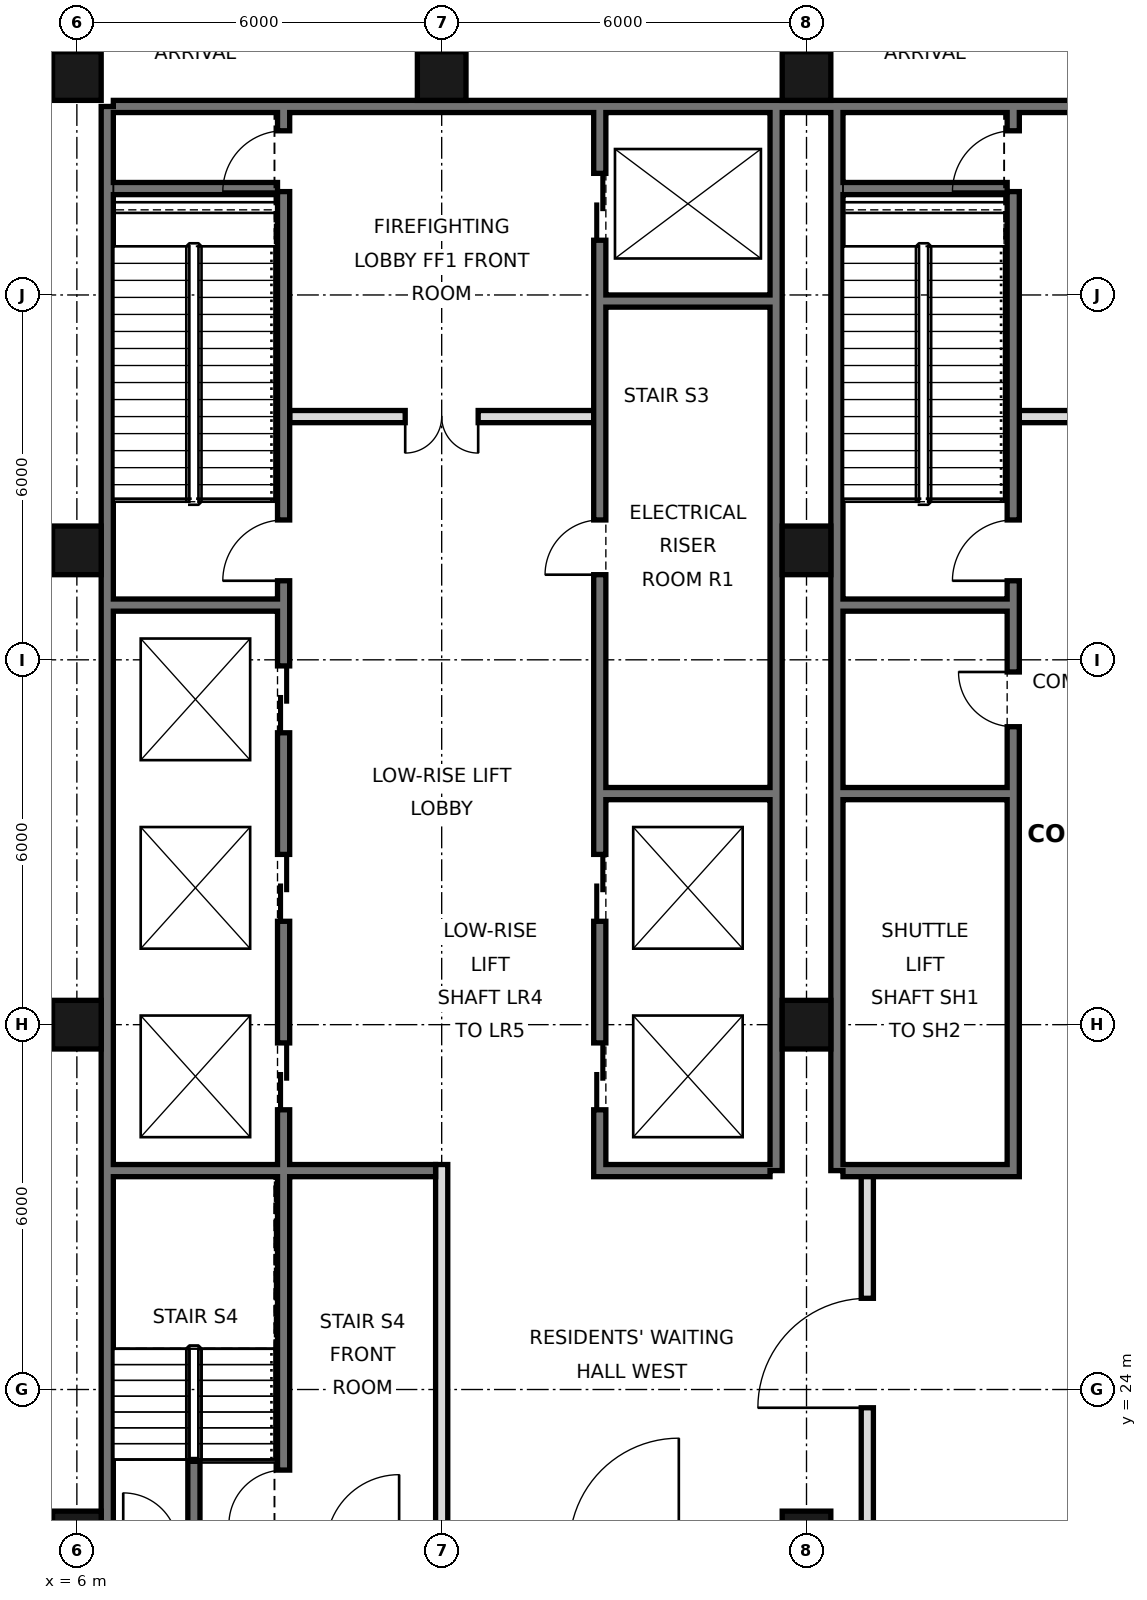
"""IFC4 building model, lengths in metres.
Left out: names, types, materials, properties, quantities, classifications, styles, units other than length and angle.
Written with IfcOpenShell. Run it as: python <this file> out.ifc"""

import sys

from ifc_helpers import new_model, si_unit, direction, frame, frame_2d, origin, origin_2d, place, context, subcontext, project, spatial, rectangle, hollow_rectangle, extrude, element, fill, save


model = new_model("IFC4")
c1 = context("Model", 3, precision=1e-05, world=origin(), true_north=direction((0.0, 1.0)))
c2 = subcontext(c1, "Body", "Model", "MODEL_VIEW")
j1 = project(units=[si_unit("LENGTHUNIT", "METRE"), si_unit("PLANEANGLEUNIT", "RADIAN")], contexts=[c1])
p1 = place(None, origin())
s1 = spatial("IfcSite", under=j1, at=p1, CompositionType="ELEMENT")
p2 = place(p1, origin())
s2 = spatial("IfcBuilding", under=s1, at=p2, CompositionType="ELEMENT")
p3 = place(p2, frame((0.0, 0.0, 138.4)))
s3 = spatial("IfcBuildingStorey", under=s2, at=p3, CompositionType="ELEMENT", Elevation=138.4)
for number, where, z_axis, x_axis in (
    (1, (6.0, 21.6, 0.0), (0.0, 0.0, 1.0), (1.0, 0.0, 0.0)),
    (2, (6.0, 30.0, 0.0), (0.0, 0.0, 1.0), (1.0, 0.0, 0.0)),
    (3, (6.0, 37.8, 0.0), (0.0, 0.0, 1.0), (1.0, 0.0, 0.0)),
    (4, (6.0, 45.6, 0.0), (0.0, 0.0, 1.0), (1.0, 0.0, 0.0)),
    (5, (12.0, 45.6, 0.0), (0.0, 0.0, 1.0), (1.0, 0.0, 0.0)),
    (6, (18.0, 21.6, 0.0), (0.0, 0.0, 1.0), (1.0, 0.0, 0.0)),
    (7, (18.0, 30.0, 0.0), (0.0, 0.0, 1.0), (1.0, 0.0, 0.0)),
    (8, (18.0, 37.8, 0.0), (0.0, 0.0, 1.0), (1.0, 0.0, 0.0)),
    (9, (18.0, 45.6, 0.0), (0.0, 0.0, 1.0), (1.0, 0.0, 0.0)),
):
    element("IfcColumn", number, at=place(p3, frame(where, z_axis=z_axis, x_axis=x_axis)), inside=s3, PredefinedType="COLUMN", context=c2, shape_type="SweptSolid", body=[
        extrude(hollow_rectangle(XDim=0.8, YDim=0.8, WallThickness=0.05, at=origin_2d()), origin(), (0.0, 0.0, 1.0), 5.4),
    ])
p4 = place(p3, frame((6.5, 21.6, 0.0), z_axis=(0.0, 0.0, 1.0), x_axis=(0.0, 1.0, 0.0)))
e10 = element("IfcWall", 10, at=p4, inside=s3, PredefinedType="SOLIDWALL", context=c2, shape_type="SweptSolid", body=[
    extrude(rectangle(XDim=23.5, YDim=0.2, at=frame_2d((11.75, 0.0))), origin(), (0.0, 0.0, 1.0), 5.22),
])
p5 = place(p3, frame((6.6, 45.1, 0.0), z_axis=(0.0, 0.0, 1.0), x_axis=(1.0, 0.0, 0.0)))
e11 = element("IfcWall", 11, at=p5, inside=s3, PredefinedType="SOLIDWALL", context=c2, shape_type="SweptSolid", body=[
    extrude(rectangle(XDim=34.8, YDim=0.2, at=frame_2d((17.4, 0.0))), origin(), (0.0, 0.0, 1.0), 5.22),
])
for number, where, z_axis, x_axis in (
    (12, (17.5, 27.6, 0.0), (0.0, 0.0, 1.0), (0.0, 1.0, 0.0)),
    (13, (18.5, 27.6, 0.0), (0.0, 0.0, 1.0), (0.0, 1.0, 0.0)),
):
    element("IfcWall", number, at=place(p3, frame(where, z_axis=z_axis, x_axis=x_axis)), inside=s3, PredefinedType="SOLIDWALL", context=c2, shape_type="SweptSolid", body=[
        extrude(rectangle(XDim=17.5, YDim=0.2, at=frame_2d((8.75, 0.0))), origin(), (0.0, 0.0, 1.0), 5.22),
    ])
p6 = place(p3, frame((19.0, 21.6, 0.0), z_axis=(0.0, 0.0, 1.0), x_axis=(0.0, 1.0, 0.0)))
e14 = element("IfcWall", 14, at=p6, inside=s3, PredefinedType="PARTITIONING", context=c2, shape_type="SweptSolid", body=[
    extrude(rectangle(XDim=6.0, YDim=0.2, at=frame_2d((3.0, 0.0))), origin(), (0.0, 0.0, 1.0), 5.22),
])
p7 = place(p6, frame((2.1, 0.0, 0.0)))
e15 = element("IfcOpeningElement", 15, at=p7, cuts=e14, PredefinedType="OPENING", context=c2, shape_type="SweptSolid", body=[
    extrude(rectangle(XDim=1.8, YDim=2.1, at=frame_2d((0.9, 1.05))), frame((0.0, 0.11, 0.0), z_axis=(0.0, -1.0, 0.0), x_axis=(1.0, 0.0, 0.0)), (0.0, 0.0, 1.0), 0.22),
])
p8 = place(p3, frame((12.0, 21.6, 0.0), z_axis=(0.0, 0.0, 1.0), x_axis=(0.0, 1.0, 0.0)))
e16 = element("IfcWall", 16, at=p8, inside=s3, PredefinedType="PARTITIONING", context=c2, shape_type="SweptSolid", body=[
    extrude(rectangle(XDim=6.1, YDim=0.2, at=frame_2d((3.05, 0.0))), origin(), (0.0, 0.0, 1.0), 5.22),
])
p9 = place(p3, frame((14.6, 27.5, 0.0), z_axis=(0.0, 0.0, 1.0), x_axis=(0.0, 1.0, 0.0)))
e17 = element("IfcWall", 17, at=p9, inside=s3, PredefinedType="SOLIDWALL", context=c2, shape_type="SweptSolid", body=[
    extrude(rectangle(XDim=17.5, YDim=0.2, at=frame_2d((8.75, 0.0))), origin(), (0.0, 0.0, 1.0), 5.22),
])
p10 = place(p9, frame((1.1, 0.0, 0.0)))
e18 = element("IfcOpeningElement", 18, at=p10, cuts=e17, PredefinedType="OPENING", context=c2, shape_type="SweptSolid", body=[
    extrude(rectangle(XDim=1.1, YDim=2.1, at=frame_2d((0.55, 1.05))), frame((0.0, 0.11, 0.0), z_axis=(0.0, -1.0, 0.0), x_axis=(1.0, 0.0, 0.0)), (0.0, 0.0, 1.0), 0.22),
])
p11 = place(p9, frame((4.2, 0.0, 0.0)))
e19 = element("IfcOpeningElement", 19, at=p11, cuts=e17, PredefinedType="OPENING", context=c2, shape_type="SweptSolid", body=[
    extrude(rectangle(XDim=1.1, YDim=2.1, at=frame_2d((0.55, 1.05))), frame((0.0, 0.11, 0.0), z_axis=(0.0, -1.0, 0.0), x_axis=(1.0, 0.0, 0.0)), (0.0, 0.0, 1.0), 0.22),
])
p12 = place(p9, frame((15.4, 0.0, 0.0)))
e20 = element("IfcOpeningElement", 20, at=p12, cuts=e17, PredefinedType="OPENING", context=c2, shape_type="SweptSolid", body=[
    extrude(rectangle(XDim=1.1, YDim=2.1, at=frame_2d((0.55, 1.05))), frame((0.0, 0.11, 0.0), z_axis=(0.0, -1.0, 0.0), x_axis=(1.0, 0.0, 0.0)), (0.0, 0.0, 1.0), 0.22),
])
p13 = place(p9, frame((9.9, 0.0, 0.0)))
e21 = element("IfcOpeningElement", 21, at=p13, cuts=e17, PredefinedType="OPENING", context=c2, shape_type="SweptSolid", body=[
    extrude(rectangle(XDim=0.9, YDim=2.1, at=frame_2d((0.45, 1.05))), frame((0.0, 0.11, 0.0), z_axis=(0.0, -1.0, 0.0), x_axis=(1.0, 0.0, 0.0)), (0.0, 0.0, 1.0), 0.22),
])
p14 = place(p3, frame((21.4, 27.5, 0.0), z_axis=(0.0, 0.0, 1.0), x_axis=(0.0, 1.0, 0.0)))
e22 = element("IfcWall", 22, at=p14, inside=s3, PredefinedType="SOLIDWALL", context=c2, shape_type="SweptSolid", body=[
    extrude(rectangle(XDim=17.5, YDim=0.2, at=frame_2d((8.75, 0.0))), origin(), (0.0, 0.0, 1.0), 5.22),
])
p15 = place(p14, frame((16.2, 0.0, 0.0)))
e23 = element("IfcOpeningElement", 23, at=p15, cuts=e22, PredefinedType="OPENING", context=c2, shape_type="SweptSolid", body=[
    extrude(rectangle(XDim=1.0, YDim=2.1, at=frame_2d((0.5, 1.05))), frame((0.0, 0.11, 0.0), z_axis=(0.0, -1.0, 0.0), x_axis=(1.0, 0.0, 0.0)), (0.0, 0.0, 1.0), 0.22),
])
p16 = place(p14, frame((9.8, 0.0, 0.0)))
e24 = element("IfcOpeningElement", 24, at=p16, cuts=e22, PredefinedType="OPENING", context=c2, shape_type="SweptSolid", body=[
    extrude(rectangle(XDim=1.0, YDim=2.1, at=frame_2d((0.5, 1.05))), frame((0.0, 0.11, 0.0), z_axis=(0.0, -1.0, 0.0), x_axis=(1.0, 0.0, 0.0)), (0.0, 0.0, 1.0), 0.22),
])
p17 = place(p14, frame((7.4, 0.0, 0.0)))
e25 = element("IfcOpeningElement", 25, at=p17, cuts=e22, PredefinedType="OPENING", context=c2, shape_type="SweptSolid", body=[
    extrude(rectangle(XDim=0.9, YDim=2.1, at=frame_2d((0.45, 1.05))), frame((0.0, 0.11, 0.0), z_axis=(0.0, -1.0, 0.0), x_axis=(1.0, 0.0, 0.0)), (0.0, 0.0, 1.0), 0.22),
])
p18 = place(p3, frame((7.925, 21.6, 0.0), z_axis=(0.0, 0.0, 1.0), x_axis=(0.0, 1.0, 0.0)))
e26 = element("IfcWall", 26, at=p18, inside=s3, PredefinedType="SOLIDWALL", context=c2, shape_type="SweptSolid", body=[
    extrude(rectangle(XDim=1.25, YDim=0.2, at=frame_2d((0.625, 0.0))), origin(), (0.0, 0.0, 1.0), 5.22),
])
p19 = place(p3, frame((9.4, 21.6, 0.0), z_axis=(0.0, 0.0, 1.0), x_axis=(0.0, 1.0, 0.0)))
e27 = element("IfcWall", 27, at=p19, inside=s3, PredefinedType="SOLIDWALL", context=c2, shape_type="SweptSolid", body=[
    extrude(rectangle(XDim=23.4, YDim=0.2, at=frame_2d((11.7, 0.0))), origin(), (0.0, 0.0, 1.0), 5.22),
])
p20 = place(p19, frame((7.0, 0.0, 0.0)))
e28 = element("IfcOpeningElement", 28, at=p20, cuts=e27, PredefinedType="OPENING", context=c2, shape_type="SweptSolid", body=[
    extrude(rectangle(XDim=1.1, YDim=2.1, at=frame_2d((0.55, 1.05))), frame((0.0, 0.11, 0.0), z_axis=(0.0, -1.0, 0.0), x_axis=(1.0, 0.0, 0.0)), (0.0, 0.0, 1.0), 0.22),
])
p21 = place(p19, frame((10.1, 0.0, 0.0)))
e29 = element("IfcOpeningElement", 29, at=p21, cuts=e27, PredefinedType="OPENING", context=c2, shape_type="SweptSolid", body=[
    extrude(rectangle(XDim=1.1, YDim=2.1, at=frame_2d((0.55, 1.05))), frame((0.0, 0.11, 0.0), z_axis=(0.0, -1.0, 0.0), x_axis=(1.0, 0.0, 0.0)), (0.0, 0.0, 1.0), 0.22),
])
p22 = place(p19, frame((13.2, 0.0, 0.0)))
e30 = element("IfcOpeningElement", 30, at=p22, cuts=e27, PredefinedType="OPENING", context=c2, shape_type="SweptSolid", body=[
    extrude(rectangle(XDim=1.1, YDim=2.1, at=frame_2d((0.55, 1.05))), frame((0.0, 0.11, 0.0), z_axis=(0.0, -1.0, 0.0), x_axis=(1.0, 0.0, 0.0)), (0.0, 0.0, 1.0), 0.22),
])
p23 = place(p19, frame((22.1, 0.0, 0.0)))
e31 = element("IfcOpeningElement", 31, at=p23, cuts=e27, PredefinedType="OPENING", context=c2, shape_type="SweptSolid", body=[
    extrude(rectangle(XDim=1.0, YDim=2.1, at=frame_2d((0.5, 1.05))), frame((0.0, 0.11, 0.0), z_axis=(0.0, -1.0, 0.0), x_axis=(1.0, 0.0, 0.0)), (0.0, 0.0, 1.0), 0.22),
])
p24 = place(p19, frame((15.7, 0.0, 0.0)))
e32 = element("IfcOpeningElement", 32, at=p24, cuts=e27, PredefinedType="OPENING", context=c2, shape_type="SweptSolid", body=[
    extrude(rectangle(XDim=1.0, YDim=2.1, at=frame_2d((0.5, 1.05))), frame((0.0, 0.11, 0.0), z_axis=(0.0, -1.0, 0.0), x_axis=(1.0, 0.0, 0.0)), (0.0, 0.0, 1.0), 0.22),
])
p25 = place(p19, frame((0.175, 0.0, 0.0)))
e33 = element("IfcOpeningElement", 33, at=p25, cuts=e27, PredefinedType="OPENING", context=c2, shape_type="SweptSolid", body=[
    extrude(rectangle(XDim=0.9, YDim=2.1, at=frame_2d((0.45, 1.05))), frame((0.0, 0.11, 0.0), z_axis=(0.0, -1.0, 0.0), x_axis=(1.0, 0.0, 0.0)), (0.0, 0.0, 1.0), 0.22),
])
for number, where, z_axis, x_axis in (
    (34, (14.7, 27.6, 0.0), (0.0, 0.0, 1.0), (1.0, 0.0, 0.0)),
    (35, (18.6, 27.6, 0.0), (0.0, 0.0, 1.0), (1.0, 0.0, 0.0)),
):
    element("IfcWall", number, at=place(p3, frame(where, z_axis=z_axis, x_axis=x_axis)), inside=s3, PredefinedType="SOLIDWALL", context=c2, shape_type="SweptSolid", body=[
        extrude(rectangle(XDim=2.7, YDim=0.2, at=frame_2d((1.35, 0.0))), origin(), (0.0, 0.0, 1.0), 5.22),
    ])
p26 = place(p3, frame((6.6, 27.6, 0.0), z_axis=(0.0, 0.0, 1.0), x_axis=(1.0, 0.0, 0.0)))
e36 = element("IfcWall", 36, at=p26, inside=s3, PredefinedType="SOLIDWALL", context=c2, shape_type="SweptSolid", body=[
    extrude(rectangle(XDim=5.3, YDim=0.2, at=frame_2d((2.65, 0.0))), origin(), (0.0, 0.0, 1.0), 5.22),
])
for number, where, z_axis, x_axis in (
    (37, (14.7, 33.8, 0.0), (0.0, 0.0, 1.0), (1.0, 0.0, 0.0)),
    (38, (18.6, 33.8, 0.0), (0.0, 0.0, 1.0), (1.0, 0.0, 0.0)),
    (39, (18.6, 36.9, 0.0), (0.0, 0.0, 1.0), (1.0, 0.0, 0.0)),
    (40, (6.6, 36.9, 0.0), (0.0, 0.0, 1.0), (1.0, 0.0, 0.0)),
):
    element("IfcWall", number, at=place(p3, frame(where, z_axis=z_axis, x_axis=x_axis)), inside=s3, PredefinedType="SOLIDWALL", context=c2, shape_type="SweptSolid", body=[
        extrude(rectangle(XDim=2.7, YDim=0.2, at=frame_2d((1.35, 0.0))), origin(), (0.0, 0.0, 1.0), 5.22),
    ])
p27 = place(p3, frame((21.5, 40.0, 0.0), z_axis=(0.0, 0.0, 1.0), x_axis=(1.0, 0.0, 0.0)))
e41 = element("IfcWall", 41, at=p27, inside=s3, PredefinedType="PARTITIONING", context=c2, shape_type="SweptSolid", body=[
    extrude(rectangle(XDim=5.0, YDim=0.2, at=frame_2d((2.5, 0.0))), origin(), (0.0, 0.0, 1.0), 5.22),
])
p28 = place(p27, frame((1.9, 0.0, 0.0)))
e42 = element("IfcOpeningElement", 42, at=p28, cuts=e41, PredefinedType="OPENING", context=c2, shape_type="SweptSolid", body=[
    extrude(rectangle(XDim=1.2, YDim=2.1, at=frame_2d((0.6, 1.05))), frame((0.0, 0.11, 0.0), z_axis=(0.0, -1.0, 0.0), x_axis=(1.0, 0.0, 0.0)), (0.0, 0.0, 1.0), 0.22),
])
p29 = place(p3, frame((9.5, 40.0, 0.0), z_axis=(0.0, 0.0, 1.0), x_axis=(1.0, 0.0, 0.0)))
e43 = element("IfcWall", 43, at=p29, inside=s3, PredefinedType="PARTITIONING", context=c2, shape_type="SweptSolid", body=[
    extrude(rectangle(XDim=5.0, YDim=0.2, at=frame_2d((2.5, 0.0))), origin(), (0.0, 0.0, 1.0), 5.22),
])
p30 = place(p29, frame((1.9, 0.0, 0.0)))
e44 = element("IfcOpeningElement", 44, at=p30, cuts=e43, PredefinedType="OPENING", context=c2, shape_type="SweptSolid", body=[
    extrude(rectangle(XDim=1.2, YDim=2.1, at=frame_2d((0.6, 1.05))), frame((0.0, 0.11, 0.0), z_axis=(0.0, -1.0, 0.0), x_axis=(1.0, 0.0, 0.0)), (0.0, 0.0, 1.0), 0.22),
])
p31 = place(p3, frame((14.7, 41.9, 0.0), z_axis=(0.0, 0.0, 1.0), x_axis=(1.0, 0.0, 0.0)))
e45 = element("IfcWall", 45, at=p31, inside=s3, PredefinedType="SOLIDWALL", context=c2, shape_type="SweptSolid", body=[
    extrude(rectangle(XDim=2.7, YDim=0.2, at=frame_2d((1.35, 0.0))), origin(), (0.0, 0.0, 1.0), 5.22),
])
for number, where, z_axis, x_axis in (
    (46, (18.6, 43.75, 0.0), (0.0, 0.0, 1.0), (1.0, 0.0, 0.0)),
    (47, (6.6, 43.75, 0.0), (0.0, 0.0, 1.0), (1.0, 0.0, 0.0)),
):
    element("IfcWall", number, at=place(p3, frame(where, z_axis=z_axis, x_axis=x_axis)), inside=s3, PredefinedType="SOLIDWALL", context=c2, shape_type="SweptSolid", body=[
        extrude(rectangle(XDim=2.7, YDim=0.2, at=frame_2d((1.35, 0.0))), origin(), (0.0, 0.0, 1.0), 2.5),
    ])
p32 = place(p7, origin())
e48 = element("IfcDoor", 48, at=p32, inside=s3, OperationType="SINGLE_SWING_LEFT", PredefinedType="DOOR", context=c2, shape_type="SweptSolid", body=[
    extrude(rectangle(XDim=1.8, YDim=2.1, at=frame_2d((0.9, 1.05))), frame((0.0, 0.025, 0.0), z_axis=(0.0, -1.0, 0.0), x_axis=(1.0, 0.0, 0.0)), (0.0, 0.0, 1.0), 0.05),
])
fill(e15, e48)
p33 = place(p30, frame((1.2, 0.0, 0.0), z_axis=(0.0, 0.0, 1.0), x_axis=(-1.0, 0.0, 0.0)))
e49 = element("IfcDoor", 49, at=p33, inside=s3, OperationType="DOUBLE_DOOR_SINGLE_SWING", PredefinedType="DOOR", context=c2, shape_type="SweptSolid", body=[
    extrude(rectangle(XDim=1.2, YDim=2.1, at=frame_2d((0.6, 1.05))), frame((0.0, 0.025, 0.0), z_axis=(0.0, -1.0, 0.0), x_axis=(1.0, 0.0, 0.0)), (0.0, 0.0, 1.0), 0.05),
])
fill(e44, e49)
p34 = place(p10, origin())
e50 = element("IfcDoor", 50, at=p34, inside=s3, OperationType="DOUBLE_DOOR_SLIDING", PredefinedType="DOOR", context=c2, shape_type="SweptSolid", body=[
    extrude(rectangle(XDim=1.1, YDim=2.1, at=frame_2d((0.55, 1.05))), frame((0.0, 0.025, 0.0), z_axis=(0.0, -1.0, 0.0), x_axis=(1.0, 0.0, 0.0)), (0.0, 0.0, 1.0), 0.05),
])
fill(e18, e50)
p35 = place(p11, origin())
e51 = element("IfcDoor", 51, at=p35, inside=s3, OperationType="DOUBLE_DOOR_SLIDING", PredefinedType="DOOR", context=c2, shape_type="SweptSolid", body=[
    extrude(rectangle(XDim=1.1, YDim=2.1, at=frame_2d((0.55, 1.05))), frame((0.0, 0.025, 0.0), z_axis=(0.0, -1.0, 0.0), x_axis=(1.0, 0.0, 0.0)), (0.0, 0.0, 1.0), 0.05),
])
fill(e19, e51)
p36 = place(p12, origin())
e52 = element("IfcDoor", 52, at=p36, inside=s3, OperationType="DOUBLE_DOOR_SLIDING", PredefinedType="DOOR", context=c2, shape_type="SweptSolid", body=[
    extrude(rectangle(XDim=1.1, YDim=2.1, at=frame_2d((0.55, 1.05))), frame((0.0, 0.025, 0.0), z_axis=(0.0, -1.0, 0.0), x_axis=(1.0, 0.0, 0.0)), (0.0, 0.0, 1.0), 0.05),
])
fill(e20, e52)
p37 = place(p20, origin())
e53 = element("IfcDoor", 53, at=p37, inside=s3, OperationType="DOUBLE_DOOR_SLIDING", PredefinedType="DOOR", context=c2, shape_type="SweptSolid", body=[
    extrude(rectangle(XDim=1.1, YDim=2.1, at=frame_2d((0.55, 1.05))), frame((0.0, 0.025, 0.0), z_axis=(0.0, -1.0, 0.0), x_axis=(1.0, 0.0, 0.0)), (0.0, 0.0, 1.0), 0.05),
])
fill(e28, e53)
p38 = place(p21, origin())
e54 = element("IfcDoor", 54, at=p38, inside=s3, OperationType="DOUBLE_DOOR_SLIDING", PredefinedType="DOOR", context=c2, shape_type="SweptSolid", body=[
    extrude(rectangle(XDim=1.1, YDim=2.1, at=frame_2d((0.55, 1.05))), frame((0.0, 0.025, 0.0), z_axis=(0.0, -1.0, 0.0), x_axis=(1.0, 0.0, 0.0)), (0.0, 0.0, 1.0), 0.05),
])
fill(e29, e54)
p39 = place(p22, origin())
e55 = element("IfcDoor", 55, at=p39, inside=s3, OperationType="DOUBLE_DOOR_SLIDING", PredefinedType="DOOR", context=c2, shape_type="SweptSolid", body=[
    extrude(rectangle(XDim=1.1, YDim=2.1, at=frame_2d((0.55, 1.05))), frame((0.0, 0.025, 0.0), z_axis=(0.0, -1.0, 0.0), x_axis=(1.0, 0.0, 0.0)), (0.0, 0.0, 1.0), 0.05),
])
fill(e30, e55)
p40 = place(p23, origin())
e56 = element("IfcDoor", 56, at=p40, inside=s3, OperationType="SINGLE_SWING_LEFT", PredefinedType="DOOR", context=c2, shape_type="SweptSolid", body=[
    extrude(rectangle(XDim=1.0, YDim=2.1, at=frame_2d((0.5, 1.05))), frame((0.0, 0.025, 0.0), z_axis=(0.0, -1.0, 0.0), x_axis=(1.0, 0.0, 0.0)), (0.0, 0.0, 1.0), 0.05),
])
fill(e31, e56)
p41 = place(p24, origin())
e57 = element("IfcDoor", 57, at=p41, inside=s3, OperationType="SINGLE_SWING_LEFT", PredefinedType="DOOR", context=c2, shape_type="SweptSolid", body=[
    extrude(rectangle(XDim=1.0, YDim=2.1, at=frame_2d((0.5, 1.05))), frame((0.0, 0.025, 0.0), z_axis=(0.0, -1.0, 0.0), x_axis=(1.0, 0.0, 0.0)), (0.0, 0.0, 1.0), 0.05),
])
fill(e32, e57)
p42 = place(p15, origin())
e58 = element("IfcDoor", 58, at=p42, inside=s3, OperationType="SINGLE_SWING_LEFT", PredefinedType="DOOR", context=c2, shape_type="SweptSolid", body=[
    extrude(rectangle(XDim=1.0, YDim=2.1, at=frame_2d((0.5, 1.05))), frame((0.0, 0.025, 0.0), z_axis=(0.0, -1.0, 0.0), x_axis=(1.0, 0.0, 0.0)), (0.0, 0.0, 1.0), 0.05),
])
fill(e23, e58)
p43 = place(p16, origin())
e59 = element("IfcDoor", 59, at=p43, inside=s3, OperationType="SINGLE_SWING_LEFT", PredefinedType="DOOR", context=c2, shape_type="SweptSolid", body=[
    extrude(rectangle(XDim=1.0, YDim=2.1, at=frame_2d((0.5, 1.05))), frame((0.0, 0.025, 0.0), z_axis=(0.0, -1.0, 0.0), x_axis=(1.0, 0.0, 0.0)), (0.0, 0.0, 1.0), 0.05),
])
fill(e24, e59)
p44 = place(p25, origin())
e60 = element("IfcDoor", 60, at=p44, inside=s3, OperationType="SINGLE_SWING_LEFT", PredefinedType="DOOR", context=c2, shape_type="SweptSolid", body=[
    extrude(rectangle(XDim=0.9, YDim=2.1, at=frame_2d((0.45, 1.05))), frame((0.0, 0.025, 0.0), z_axis=(0.0, -1.0, 0.0), x_axis=(1.0, 0.0, 0.0)), (0.0, 0.0, 1.0), 0.05),
])
fill(e33, e60)
p45 = place(p13, origin())
e61 = element("IfcDoor", 61, at=p45, inside=s3, OperationType="SINGLE_SWING_LEFT", PredefinedType="DOOR", context=c2, shape_type="SweptSolid", body=[
    extrude(rectangle(XDim=0.9, YDim=2.1, at=frame_2d((0.45, 1.05))), frame((0.0, 0.025, 0.0), z_axis=(0.0, -1.0, 0.0), x_axis=(1.0, 0.0, 0.0)), (0.0, 0.0, 1.0), 0.05),
])
fill(e21, e61)
p46 = place(p17, frame((0.9, 0.0, 0.0), z_axis=(0.0, 0.0, 1.0), x_axis=(-1.0, 0.0, 0.0)))
e62 = element("IfcDoor", 62, at=p46, inside=s3, OperationType="SINGLE_SWING_LEFT", PredefinedType="DOOR", context=c2, shape_type="SweptSolid", body=[
    extrude(rectangle(XDim=0.9, YDim=2.1, at=frame_2d((0.45, 1.05))), frame((0.0, 0.025, 0.0), z_axis=(0.0, -1.0, 0.0), x_axis=(1.0, 0.0, 0.0)), (0.0, 0.0, 1.0), 0.05),
])
fill(e25, e62)
save(model, sys.argv[1])
